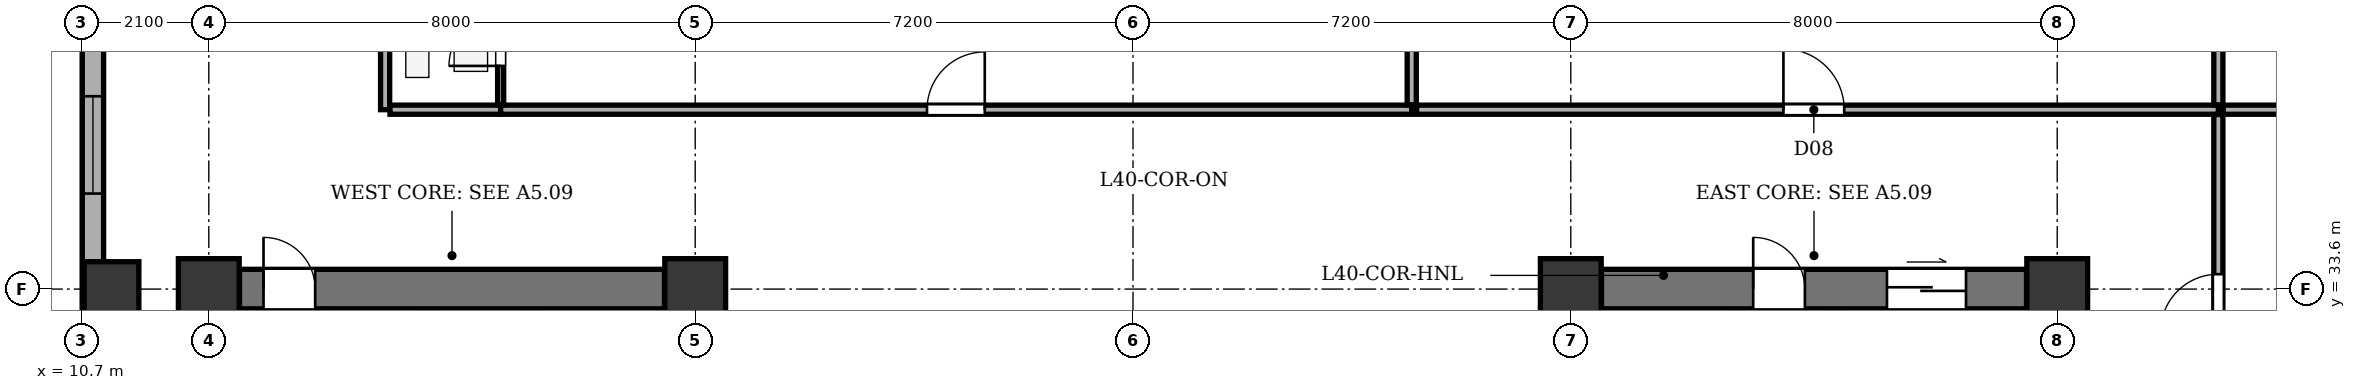
"""IFC4 building model, lengths in metres.
Left out: names, types, materials, properties, quantities, classifications, styles, units other than length and angle.
Written with IfcOpenShell. Run it as: python <this file> out.ifc"""

import sys

from ifc_helpers import new_model, si_unit, direction, frame, frame_2d, origin, origin_2d, place, context, subcontext, project, spatial, rectangle, extrude, element, fill, save


model = new_model("IFC4")
c1 = context("Model", 3, precision=1e-05, world=origin(), true_north=direction((0.0, 1.0)))
c2 = subcontext(c1, "Body", "Model", "MODEL_VIEW")
j1 = project(units=[si_unit("LENGTHUNIT", "METRE"), si_unit("PLANEANGLEUNIT", "RADIAN")], contexts=[c1])
p1 = place(None, origin())
s1 = spatial("IfcSite", under=j1, at=p1, CompositionType="ELEMENT")
p2 = place(p1, origin())
s2 = spatial("IfcBuilding", under=s1, at=p2, CompositionType="ELEMENT")
p3 = place(p2, frame((0.0, 0.0, 158.8)))
s3 = spatial("IfcBuildingStorey", under=s2, at=p3, CompositionType="ELEMENT", Elevation=158.8)
for number, where, z_axis, x_axis in (
    (1, (12.8, 33.6, 0.0), (0.0, 0.0, 1.0), (1.0, 0.0, 0.0)),
    (2, (20.8, 33.6, 0.0), (0.0, 0.0, 1.0), (1.0, 0.0, 0.0)),
    (3, (35.2, 33.6, 0.0), (0.0, 0.0, 1.0), (1.0, 0.0, 0.0)),
    (4, (43.2, 33.6, 0.0), (0.0, 0.0, 1.0), (1.0, 0.0, 0.0)),
):
    element("IfcColumn", number, at=place(p3, frame(where, z_axis=z_axis, x_axis=x_axis)), inside=s3, PredefinedType="COLUMN", context=c2, shape_type="SweptSolid", body=[
        extrude(rectangle(XDim=1.0, YDim=1.0, at=origin_2d()), origin(), (0.0, 0.0, 1.0), 3.5),
    ])
p4 = place(p3, frame((11.2, 33.6, 0.0), z_axis=(0.0, 0.0, 1.0), x_axis=(1.0, 0.0, 0.0)))
e5 = element("IfcColumn", 5, at=p4, inside=s3, PredefinedType="COLUMN", context=c2, shape_type="SweptSolid", body=[
    extrude(rectangle(XDim=0.9, YDim=0.9, at=origin_2d()), origin(), (0.0, 0.0, 1.0), 3.5),
])
p5 = place(p3, frame((10.895, 6.5, 0.0), z_axis=(0.0, 0.0, 1.0), x_axis=(0.0, 1.0, 0.0)))
e6 = element("IfcWall", 6, at=p5, inside=s3, PredefinedType="STANDARD", context=c2, shape_type="SweptSolid", body=[
    extrude(rectangle(XDim=35.0, YDim=0.35, at=frame_2d((17.5, 0.0))), origin(), (0.0, 0.0, 1.0), 2.435),
])
p6 = place(p5, frame((2.513, 0.0, 0.75)))
e7 = element("IfcOpeningElement", 7, at=p6, cuts=e6, PredefinedType="OPENING", context=c2, shape_type="SweptSolid", body=[
    extrude(rectangle(XDim=1.6, YDim=1.565, at=frame_2d((0.8, 0.782))), frame((0.0, 0.185, 0.0), z_axis=(0.0, -1.0, 0.0), x_axis=(1.0, 0.0, 0.0)), (0.0, 0.0, 1.0), 0.37),
])
p7 = place(p5, frame((7.879, 0.0, 0.75)))
e8 = element("IfcOpeningElement", 8, at=p7, cuts=e6, PredefinedType="OPENING", context=c2, shape_type="SweptSolid", body=[
    extrude(rectangle(XDim=1.6, YDim=1.565, at=frame_2d((0.8, 0.782))), frame((0.0, 0.185, 0.0), z_axis=(0.0, -1.0, 0.0), x_axis=(1.0, 0.0, 0.0)), (0.0, 0.0, 1.0), 0.37),
])
p8 = place(p5, frame((11.071, 0.0, 0.75)))
e9 = element("IfcOpeningElement", 9, at=p8, cuts=e6, PredefinedType="OPENING", context=c2, shape_type="SweptSolid", body=[
    extrude(rectangle(XDim=1.6, YDim=1.565, at=frame_2d((0.8, 0.782))), frame((0.0, 0.185, 0.0), z_axis=(0.0, -1.0, 0.0), x_axis=(1.0, 0.0, 0.0)), (0.0, 0.0, 1.0), 0.37),
])
p9 = place(p5, frame((17.164, 0.0, 0.75)))
e10 = element("IfcOpeningElement", 10, at=p9, cuts=e6, PredefinedType="OPENING", context=c2, shape_type="SweptSolid", body=[
    extrude(rectangle(XDim=1.6, YDim=1.565, at=frame_2d((0.8, 0.782))), frame((0.0, 0.185, 0.0), z_axis=(0.0, -1.0, 0.0), x_axis=(1.0, 0.0, 0.0)), (0.0, 0.0, 1.0), 0.37),
])
p10 = place(p5, frame((22.386, 0.0, 0.75)))
e11 = element("IfcOpeningElement", 11, at=p10, cuts=e6, PredefinedType="OPENING", context=c2, shape_type="SweptSolid", body=[
    extrude(rectangle(XDim=2.1, YDim=1.565, at=frame_2d((1.05, 0.782))), frame((0.0, 0.185, 0.0), z_axis=(0.0, -1.0, 0.0), x_axis=(1.0, 0.0, 0.0)), (0.0, 0.0, 1.0), 0.37),
])
p11 = place(p5, frame((28.671, 0.0, 0.75)))
e12 = element("IfcOpeningElement", 12, at=p11, cuts=e6, PredefinedType="OPENING", context=c2, shape_type="SweptSolid", body=[
    extrude(rectangle(XDim=1.6, YDim=1.565, at=frame_2d((0.8, 0.782))), frame((0.0, 0.185, 0.0), z_axis=(0.0, -1.0, 0.0), x_axis=(1.0, 0.0, 0.0)), (0.0, 0.0, 1.0), 0.37),
])
p12 = place(p5, frame((31.755, 0.0, 0.75)))
e13 = element("IfcOpeningElement", 13, at=p12, cuts=e6, PredefinedType="OPENING", context=c2, shape_type="SweptSolid", body=[
    extrude(rectangle(XDim=1.6, YDim=1.565, at=frame_2d((0.8, 0.782))), frame((0.0, 0.185, 0.0), z_axis=(0.0, -1.0, 0.0), x_axis=(1.0, 0.0, 0.0)), (0.0, 0.0, 1.0), 0.37),
])
p13 = place(p3, frame((13.305, 33.6, 0.0), z_axis=(0.0, 0.0, 1.0), x_axis=(1.0, 0.0, 0.0)))
e14 = element("IfcWall", 14, at=p13, inside=s3, PredefinedType="SHEAR", context=c2, shape_type="SweptSolid", body=[
    extrude(rectangle(XDim=6.99, YDim=0.65, at=frame_2d((3.495, 0.0))), origin(), (0.0, 0.0, 1.0), 3.05),
])
p14 = place(p13, frame((0.395, 0.0, 0.0)))
e15 = element("IfcOpeningElement", 15, at=p14, cuts=e14, PredefinedType="OPENING", context=c2, shape_type="SweptSolid", body=[
    extrude(rectangle(XDim=0.85, YDim=2.02, at=frame_2d((0.425, 1.01))), frame((0.0, 0.335, 0.0), z_axis=(0.0, -1.0, 0.0), x_axis=(1.0, 0.0, 0.0)), (0.0, 0.0, 1.0), 0.67),
])
p15 = place(p3, frame((16.435, 21.135, 0.0), z_axis=(0.0, 0.0, 1.0), x_axis=(0.0, 1.0, 0.0)))
e16 = element("IfcWall", 16, at=p15, inside=s3, PredefinedType="SHEAR", context=c2, shape_type="SweptSolid", body=[
    extrude(rectangle(XDim=12.13, YDim=0.25, at=frame_2d((6.065, 0.0))), origin(), (0.0, 0.0, 1.0), 3.05),
])
p16 = place(p15, frame((0.515, 0.0, 0.0)))
e17 = element("IfcOpeningElement", 17, at=p16, cuts=e16, PredefinedType="OPENING", context=c2, shape_type="SweptSolid", body=[
    extrude(rectangle(XDim=1.2, YDim=2.15, at=frame_2d((0.6, 1.075))), frame((0.0, 0.135, 0.0), z_axis=(0.0, -1.0, 0.0), x_axis=(1.0, 0.0, 0.0)), (0.0, 0.0, 1.0), 0.27),
])
p17 = place(p15, frame((2.665, 0.0, 0.0)))
e18 = element("IfcOpeningElement", 18, at=p17, cuts=e16, PredefinedType="OPENING", context=c2, shape_type="SweptSolid", body=[
    extrude(rectangle(XDim=1.15, YDim=2.15, at=frame_2d((0.575, 1.075))), frame((0.0, 0.135, 0.0), z_axis=(0.0, -1.0, 0.0), x_axis=(1.0, 0.0, 0.0)), (0.0, 0.0, 1.0), 0.27),
])
p18 = place(p3, frame((18.12, 31.17, 0.0), z_axis=(0.0, 0.0, 1.0), x_axis=(0.0, 1.0, 0.0)))
e19 = element("IfcWall", 19, at=p18, inside=s3, PredefinedType="PARTITIONING", context=c2, shape_type="SweptSolid", body=[
    extrude(rectangle(XDim=2.095, YDim=0.18, at=frame_2d((1.047, 0.0))), origin(), (0.0, 0.0, 1.0), 3.05),
])
p19 = place(p3, frame((35.705, 33.6, 0.0), z_axis=(0.0, 0.0, 1.0), x_axis=(1.0, 0.0, 0.0)))
e20 = element("IfcWall", 20, at=p19, inside=s3, PredefinedType="SHEAR", context=c2, shape_type="SweptSolid", body=[
    extrude(rectangle(XDim=6.99, YDim=0.65, at=frame_2d((3.495, 0.0))), origin(), (0.0, 0.0, 1.0), 3.05),
])
p20 = place(p19, frame((4.695, 0.0, 0.0)))
e21 = element("IfcOpeningElement", 21, at=p20, cuts=e20, PredefinedType="OPENING", context=c2, shape_type="SweptSolid", body=[
    extrude(rectangle(XDim=1.3, YDim=2.15, at=frame_2d((0.65, 1.075))), frame((0.0, 0.335, 0.0), z_axis=(0.0, -1.0, 0.0), x_axis=(1.0, 0.0, 0.0)), (0.0, 0.0, 1.0), 0.67),
])
p21 = place(p19, frame((2.495, 0.0, 0.0)))
e22 = element("IfcOpeningElement", 22, at=p21, cuts=e20, PredefinedType="OPENING", context=c2, shape_type="SweptSolid", body=[
    extrude(rectangle(XDim=0.85, YDim=2.02, at=frame_2d((0.425, 1.01))), frame((0.0, 0.335, 0.0), z_axis=(0.0, -1.0, 0.0), x_axis=(1.0, 0.0, 0.0)), (0.0, 0.0, 1.0), 0.67),
])
p22 = place(p3, frame((39.565, 21.135, 0.0), z_axis=(0.0, 0.0, 1.0), x_axis=(0.0, 1.0, 0.0)))
e23 = element("IfcWall", 23, at=p22, inside=s3, PredefinedType="SHEAR", context=c2, shape_type="SweptSolid", body=[
    extrude(rectangle(XDim=12.13, YDim=0.25, at=frame_2d((6.065, 0.0))), origin(), (0.0, 0.0, 1.0), 3.05),
])
p23 = place(p22, frame((0.515, 0.0, 0.0)))
e24 = element("IfcOpeningElement", 24, at=p23, cuts=e23, PredefinedType="OPENING", context=c2, shape_type="SweptSolid", body=[
    extrude(rectangle(XDim=1.2, YDim=2.15, at=frame_2d((0.6, 1.075))), frame((0.0, 0.135, 0.0), z_axis=(0.0, -1.0, 0.0), x_axis=(1.0, 0.0, 0.0)), (0.0, 0.0, 1.0), 0.27),
])
p24 = place(p22, frame((2.665, 0.0, 0.0)))
e25 = element("IfcOpeningElement", 25, at=p24, cuts=e23, PredefinedType="OPENING", context=c2, shape_type="SweptSolid", body=[
    extrude(rectangle(XDim=1.15, YDim=2.15, at=frame_2d((0.575, 1.075))), frame((0.0, 0.135, 0.0), z_axis=(0.0, -1.0, 0.0), x_axis=(1.0, 0.0, 0.0)), (0.0, 0.0, 1.0), 0.27),
])
p25 = place(p3, frame((37.9, 25.27, 0.0), z_axis=(0.0, 0.0, 1.0), x_axis=(0.0, 1.0, 0.0)))
e26 = element("IfcWall", 26, at=p25, inside=s3, PredefinedType="SOLIDWALL", context=c2, shape_type="SweptSolid", body=[
    extrude(rectangle(XDim=7.995, YDim=0.2, at=frame_2d((3.998, 0.0))), origin(), (0.0, 0.0, 1.0), 3.05),
])
p26 = place(p3, frame((14.75, 30.96, 0.0), z_axis=(0.0, 0.0, 1.0), x_axis=(0.0, 1.0, 0.0)))
e27 = element("IfcWall", 27, at=p26, inside=s3, PredefinedType="PARTITIONING", context=c2, shape_type="SweptSolid", body=[
    extrude(rectangle(XDim=2.31, YDim=0.15, at=frame_2d((1.155, 0.0))), origin(), (0.0, 0.0, 1.0), 3.05),
])
p27 = place(p26, frame((0.47, 0.0, 0.0)))
e28 = element("IfcOpeningElement", 28, at=p27, cuts=e27, PredefinedType="OPENING", context=c2, shape_type="SweptSolid", body=[
    extrude(rectangle(XDim=0.85, YDim=2.02, at=frame_2d((0.425, 1.01))), frame((0.0, 0.085, 0.0), z_axis=(0.0, -1.0, 0.0), x_axis=(1.0, 0.0, 0.0)), (0.0, 0.0, 1.0), 0.17),
])
p28 = place(p3, frame((15.7, 36.55, 0.0), z_axis=(0.0, 0.0, 1.0), x_axis=(0.0, 1.0, 0.0)))
e29 = element("IfcWall", 29, at=p28, inside=s3, PredefinedType="PARTITIONING", context=c2, shape_type="SweptSolid", body=[
    extrude(rectangle(XDim=9.575, YDim=0.15, at=frame_2d((4.788, 0.0))), origin(), (0.0, 0.0, 1.0), 1.635),
])
p29 = place(p3, frame((15.78, 36.55, 0.0), z_axis=(0.0, 0.0, 1.0), x_axis=(1.0, 0.0, 0.0)))
e30 = element("IfcWall", 30, at=p29, inside=s3, PredefinedType="PARTITIONING", context=c2, shape_type="SweptSolid", body=[
    extrude(rectangle(XDim=1.82, YDim=0.15, at=frame_2d((0.91, 0.0))), origin(), (0.0, 0.0, 1.0), 3.05),
])
p30 = place(p3, frame((17.6, 36.55, 0.0), z_axis=(0.0, 0.0, 1.0), x_axis=(1.0, 0.0, 0.0)))
e31 = element("IfcWall", 31, at=p30, inside=s3, PredefinedType="PARTITIONING", context=c2, shape_type="SweptSolid", body=[
    extrude(rectangle(XDim=14.984, YDim=0.15, at=frame_2d((7.492, 0.0))), origin(), (0.0, 0.0, 1.0), 3.05),
])
p31 = place(p30, frame((7.012, 0.0, 0.0)))
e32 = element("IfcOpeningElement", 32, at=p31, cuts=e31, PredefinedType="OPENING", context=c2, shape_type="SweptSolid", body=[
    extrude(rectangle(XDim=0.95, YDim=2.1, at=frame_2d((0.475, 1.05))), frame((0.0, 0.085, 0.0), z_axis=(0.0, -1.0, 0.0), x_axis=(1.0, 0.0, 0.0)), (0.0, 0.0, 1.0), 0.17),
])
p32 = place(p3, frame((17.6, 36.63, 0.0), z_axis=(0.0, 0.0, 1.0), x_axis=(0.0, 1.0, 0.0)))
e33 = element("IfcWall", 33, at=p32, inside=s3, PredefinedType="PARTITIONING", context=c2, shape_type="SweptSolid", body=[
    extrude(rectangle(XDim=2.25, YDim=0.1, at=frame_2d((1.125, 0.0))), origin(), (0.0, 0.0, 1.0), 3.05),
])
p33 = place(p32, frame((0.64, 0.0, 0.0)))
e34 = element("IfcOpeningElement", 34, at=p33, cuts=e33, PredefinedType="OPENING", context=c2, shape_type="SweptSolid", body=[
    extrude(rectangle(XDim=0.85, YDim=2.05, at=frame_2d((0.425, 1.025))), frame((0.0, 0.06, 0.0), z_axis=(0.0, -1.0, 0.0), x_axis=(1.0, 0.0, 0.0)), (0.0, 0.0, 1.0), 0.12),
])
p34 = place(p3, frame((32.584, 36.63, 0.0), z_axis=(0.0, 0.0, 1.0), x_axis=(0.0, 1.0, 0.0)))
e35 = element("IfcWall", 35, at=p34, inside=s3, PredefinedType="PARTITIONING", context=c2, shape_type="SweptSolid", body=[
    extrude(rectangle(XDim=9.495, YDim=0.15, at=frame_2d((4.748, 0.0))), origin(), (0.0, 0.0, 1.0), 3.05),
])
p35 = place(p3, frame((32.664, 36.55, 0.0), z_axis=(0.0, 0.0, 1.0), x_axis=(1.0, 0.0, 0.0)))
e36 = element("IfcWall", 36, at=p35, inside=s3, PredefinedType="PARTITIONING", context=c2, shape_type="SweptSolid", body=[
    extrude(rectangle(XDim=13.186, YDim=0.15, at=frame_2d((6.593, 0.0))), origin(), (0.0, 0.0, 1.0), 3.05),
])
p36 = place(p35, frame((6.033, 0.0, 0.0)))
e37 = element("IfcOpeningElement", 37, at=p36, cuts=e36, PredefinedType="OPENING", context=c2, shape_type="SweptSolid", body=[
    extrude(rectangle(XDim=1.0, YDim=2.1, at=frame_2d((0.5, 1.05))), frame((0.0, 0.085, 0.0), z_axis=(0.0, -1.0, 0.0), x_axis=(1.0, 0.0, 0.0)), (0.0, 0.0, 1.0), 0.17),
])
p37 = place(p3, frame((45.85, 36.63, 0.0), z_axis=(0.0, 0.0, 1.0), x_axis=(0.0, 1.0, 0.0)))
e38 = element("IfcWall", 38, at=p37, inside=s3, PredefinedType="PARTITIONING", context=c2, shape_type="SweptSolid", body=[
    extrude(rectangle(XDim=9.495, YDim=0.15, at=frame_2d((4.748, 0.0))), origin(), (0.0, 0.0, 1.0), 3.05),
])
p38 = place(p3, frame((45.93, 36.55, 0.0), z_axis=(0.0, 0.0, 1.0), x_axis=(1.0, 0.0, 0.0)))
e39 = element("IfcWall", 39, at=p38, inside=s3, PredefinedType="PARTITIONING", context=c2, shape_type="SweptSolid", body=[
    extrude(rectangle(XDim=9.395, YDim=0.15, at=frame_2d((4.698, 0.0))), origin(), (0.0, 0.0, 1.0), 3.05),
])
p39 = place(p3, frame((45.85, 30.28, 0.0), z_axis=(0.0, 0.0, 1.0), x_axis=(0.0, 1.0, 0.0)))
e40 = element("IfcWall", 40, at=p39, inside=s3, PredefinedType="PARTITIONING", context=c2, shape_type="SweptSolid", body=[
    extrude(rectangle(XDim=6.19, YDim=0.15, at=frame_2d((3.095, 0.0))), origin(), (0.0, 0.0, 1.0), 3.05),
])
p40 = place(p39, frame((2.615, 0.0, 0.0)))
e41 = element("IfcOpeningElement", 41, at=p40, cuts=e40, PredefinedType="OPENING", context=c2, shape_type="SweptSolid", body=[
    extrude(rectangle(XDim=0.95, YDim=2.1, at=frame_2d((0.475, 1.05))), frame((0.0, 0.085, 0.0), z_axis=(0.0, -1.0, 0.0), x_axis=(1.0, 0.0, 0.0)), (0.0, 0.0, 1.0), 0.17),
])
p41 = place(p11, origin())
e42 = element("IfcWindow", 42, at=p41, inside=s3, PartitioningType="SINGLE_PANEL", PredefinedType="WINDOW", context=c2, shape_type="SweptSolid", body=[
    extrude(rectangle(XDim=1.6, YDim=1.565, at=frame_2d((0.8, 0.782))), frame((0.0, -0.01, 0.0), z_axis=(0.0, -1.0, 0.0), x_axis=(1.0, 0.0, 0.0)), (0.0, 0.0, 1.0), 0.06),
])
fill(e12, e42)
p42 = place(p14, origin())
e43 = element("IfcDoor", 43, at=p42, inside=s3, OperationType="SINGLE_SWING_LEFT", PredefinedType="DOOR", context=c2, shape_type="SweptSolid", body=[
    extrude(rectangle(XDim=0.85, YDim=2.02, at=frame_2d((0.425, 1.01))), frame((0.0, 0.025, 0.0), z_axis=(0.0, -1.0, 0.0), x_axis=(1.0, 0.0, 0.0)), (0.0, 0.0, 1.0), 0.05),
])
fill(e15, e43)
p43 = place(p20, origin())
e44 = element("IfcDoor", 44, at=p43, inside=s3, OperationType="DOUBLE_DOOR_SLIDING", PredefinedType="DOOR", context=c2, shape_type="SweptSolid", body=[
    extrude(rectangle(XDim=1.3, YDim=2.15, at=frame_2d((0.65, 1.075))), frame((0.0, 0.025, 0.0), z_axis=(0.0, -1.0, 0.0), x_axis=(1.0, 0.0, 0.0)), (0.0, 0.0, 1.0), 0.05),
])
fill(e21, e44)
p44 = place(p21, origin())
e45 = element("IfcDoor", 45, at=p44, inside=s3, OperationType="SINGLE_SWING_LEFT", PredefinedType="DOOR", context=c2, shape_type="SweptSolid", body=[
    extrude(rectangle(XDim=0.85, YDim=2.02, at=frame_2d((0.425, 1.01))), frame((0.0, 0.025, 0.0), z_axis=(0.0, -1.0, 0.0), x_axis=(1.0, 0.0, 0.0)), (0.0, 0.0, 1.0), 0.05),
])
fill(e22, e45)
p45 = place(p33, origin())
e46 = element("IfcDoor", 46, at=p45, inside=s3, OperationType="SINGLE_SWING_LEFT", PredefinedType="DOOR", context=c2, shape_type="SweptSolid", body=[
    extrude(rectangle(XDim=0.85, YDim=2.05, at=frame_2d((0.425, 1.025))), frame((0.0, 0.025, 0.0), z_axis=(0.0, -1.0, 0.0), x_axis=(1.0, 0.0, 0.0)), (0.0, 0.0, 1.0), 0.05),
])
fill(e34, e46)
p46 = place(p31, origin())
e47 = element("IfcDoor", 47, at=p46, inside=s3, OperationType="SINGLE_SWING_RIGHT", PredefinedType="DOOR", context=c2, shape_type="SweptSolid", body=[
    extrude(rectangle(XDim=0.95, YDim=2.1, at=frame_2d((0.475, 1.05))), frame((0.0, 0.025, 0.0), z_axis=(0.0, -1.0, 0.0), x_axis=(1.0, 0.0, 0.0)), (0.0, 0.0, 1.0), 0.05),
])
fill(e32, e47)
p47 = place(p36, origin())
e48 = element("IfcDoor", 48, at=p47, inside=s3, OperationType="SINGLE_SWING_LEFT", PredefinedType="DOOR", context=c2, shape_type="SweptSolid", body=[
    extrude(rectangle(XDim=1.0, YDim=2.1, at=frame_2d((0.5, 1.05))), frame((0.0, 0.025, 0.0), z_axis=(0.0, -1.0, 0.0), x_axis=(1.0, 0.0, 0.0)), (0.0, 0.0, 1.0), 0.05),
])
fill(e37, e48)
p48 = place(p40, origin())
e49 = element("IfcDoor", 49, at=p48, inside=s3, OperationType="SINGLE_SWING_LEFT", PredefinedType="DOOR", context=c2, shape_type="SweptSolid", body=[
    extrude(rectangle(XDim=0.95, YDim=2.1, at=frame_2d((0.475, 1.05))), frame((0.0, 0.025, 0.0), z_axis=(0.0, -1.0, 0.0), x_axis=(1.0, 0.0, 0.0)), (0.0, 0.0, 1.0), 0.05),
])
fill(e41, e49)
save(model, sys.argv[1])
